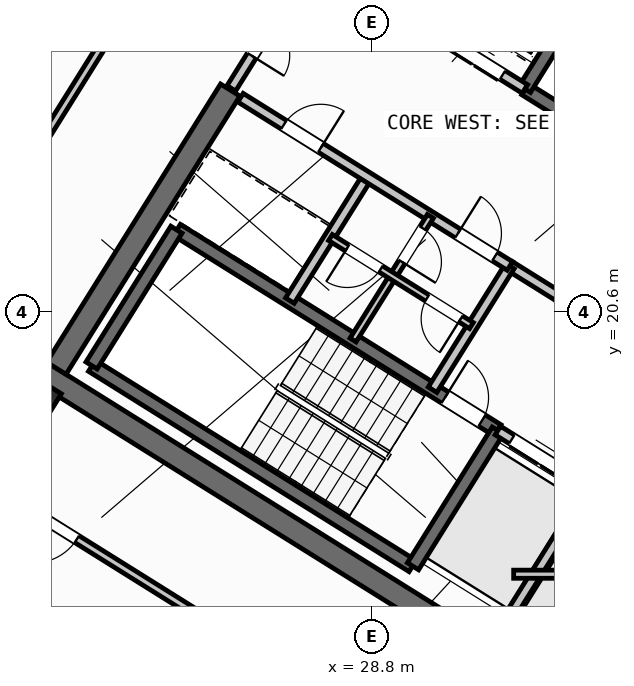
"""IFC4 building model, lengths in metres.
Left out: names, types, materials, properties, quantities, classifications, styles, units other than length and angle.
Written with IfcOpenShell. Run it as: python <this file> out.ifc"""

import sys

from ifc_helpers import new_model, si_unit, direction, frame, frame_2d, origin, origin_2d, place, context, subcontext, project, spatial, rectangle, hollow_rectangle, extrude, source, transform, mapped, element, fill, save


model = new_model("IFC4")
c1 = context("Model", 3, precision=1e-05, world=origin(), true_north=direction((0.0, 1.0)))
c2 = subcontext(c1, "Body", "Model", "MODEL_VIEW")
j1 = project(units=[si_unit("LENGTHUNIT", "METRE"), si_unit("PLANEANGLEUNIT", "RADIAN")], contexts=[c1])
p1 = place(None, origin())
s1 = spatial("IfcSite", under=j1, at=p1, CompositionType="ELEMENT")
p2 = place(p1, origin())
s2 = spatial("IfcBuilding", under=s1, at=p2, CompositionType="ELEMENT")
p3 = place(p2, frame((0.0, 0.0, 288.0)))
s3 = spatial("IfcBuildingStorey", under=s2, at=p3, CompositionType="ELEMENT", Elevation=288.0)
p4 = place(p3, frame((40.531, 24.036, 0.0), z_axis=(0.0, 0.0, 1.0), x_axis=(-0.848048787466, 0.529918157905, 0.0)))
e1 = element("IfcWall", 1, at=p4, inside=s3, PredefinedType="SHEAR", context=c2, shape_type="SweptSolid", body=[
    extrude(rectangle(XDim=13.04, YDim=0.45, at=frame_2d((6.52, 0.0))), origin(), (0.0, 0.0, 1.0), 3.35),
])
p5 = place(p3, frame((33.324, 12.503, 0.0), z_axis=(0.0, 0.0, 1.0), x_axis=(-0.848043529849, 0.529926571782, 0.0)))
e2 = element("IfcWall", 2, at=p5, inside=s3, PredefinedType="SHEAR", context=c2, shape_type="SweptSolid", body=[
    extrude(rectangle(XDim=13.04, YDim=0.45, at=frame_2d((6.52, 0.0))), origin(), (0.0, 0.0, 1.0), 3.35),
])
p6 = place(p3, frame((26.007, 24.976, 0.0), z_axis=(0.0, 0.0, 1.0), x_axis=(-0.529931155655, -0.848040665456, 0.0)))
e3 = element("IfcWall", 3, at=p6, inside=s3, PredefinedType="SHEAR", context=c2, shape_type="SweptSolid", body=[
    extrude(rectangle(XDim=6.475, YDim=0.45, at=frame_2d((3.238, 0.0))), origin(), (0.0, 0.0, 1.0), 3.35),
])
m1 = source(origin(), c2, "Body", "SweptSolid", [
    extrude(hollow_rectangle(XDim=0.7, YDim=0.7, WallThickness=0.028, at=origin_2d()), origin(), (0.0, 0.0, 1.0), 3.6),
])
p7 = place(p3, frame((22.191, 18.87, 0.0), z_axis=(0.0, 0.0, 1.0), x_axis=(-0.848048096156, 0.529919264233, 0.0)))
e4 = element("IfcColumn", 4, at=p7, inside=s3, PredefinedType="COLUMN", context=c2, shape_type="MappedRepresentation", body=[
    mapped(m1, transform((0.0, 0.0, 0.0), scale=1.0)),
])
p8 = place(p3, frame((29.268, 6.429, 0.0), z_axis=(0.0, 0.0, 1.0), x_axis=(-0.848048398186, 0.529918780885, 0.0)))
e5 = element("IfcWall", 5, at=p8, inside=s3, PredefinedType="STANDARD", context=c2, shape_type="SweptSolid", body=[
    extrude(rectangle(XDim=25.188, YDim=0.32, at=frame_2d((12.594, 0.0))), origin(), (0.0, 0.0, 1.0), 3.35),
])
p9 = place(p8, frame((16.362, 0.0, 0.0)))
e6 = element("IfcOpeningElement", 6, at=p9, cuts=e5, PredefinedType="OPENING", context=c2, shape_type="SweptSolid", body=[
    extrude(rectangle(XDim=1.2, YDim=2.15, at=frame_2d((0.6, 1.075))), frame((0.0, 0.17, 0.0), z_axis=(0.0, -1.0, 0.0), x_axis=(1.0, 0.0, 0.0)), (0.0, 0.0, 1.0), 0.34),
])
p10 = place(p8, frame((3.859, 0.0, 0.9)))
e7 = element("IfcOpeningElement", 7, at=p10, cuts=e5, PredefinedType="OPENING", context=c2, shape_type="SweptSolid", body=[
    extrude(rectangle(XDim=1.65, YDim=1.45, at=frame_2d((0.825, 0.725))), frame((0.0, 0.17, 0.0), z_axis=(0.0, -1.0, 0.0), x_axis=(1.0, 0.0, 0.0)), (0.0, 0.0, 1.0), 0.34),
])
p11 = place(p8, frame((10.519, 0.0, 0.9)))
e8 = element("IfcOpeningElement", 8, at=p11, cuts=e5, PredefinedType="OPENING", context=c2, shape_type="SweptSolid", body=[
    extrude(rectangle(XDim=1.65, YDim=1.45, at=frame_2d((0.825, 0.725))), frame((0.0, 0.17, 0.0), z_axis=(0.0, -1.0, 0.0), x_axis=(1.0, 0.0, 0.0)), (0.0, 0.0, 1.0), 0.34),
])
p12 = place(p8, frame((19.841, 0.0, 0.95)))
e9 = element("IfcOpeningElement", 9, at=p12, cuts=e5, PredefinedType="OPENING", context=c2, shape_type="SweptSolid", body=[
    extrude(rectangle(XDim=1.95, YDim=1.35, at=frame_2d((0.975, 0.675))), frame((0.0, 0.17, 0.0), z_axis=(0.0, -1.0, 0.0), x_axis=(1.0, 0.0, 0.0)), (0.0, 0.0, 1.0), 0.34),
])
p13 = place(p8, frame((23.478, 0.0, 1.0)))
e10 = element("IfcOpeningElement", 10, at=p13, cuts=e5, PredefinedType="OPENING", context=c2, shape_type="SweptSolid", body=[
    extrude(rectangle(XDim=0.9, YDim=1.25, at=frame_2d((0.45, 0.625))), frame((0.0, 0.17, 0.0), z_axis=(0.0, -1.0, 0.0), x_axis=(1.0, 0.0, 0.0)), (0.0, 0.0, 1.0), 0.34),
])
p14 = place(p3, frame((19.566, 38.434, 0.0), z_axis=(0.0, 0.0, 1.0), x_axis=(0.84804567626, -0.529923136858, 0.0)))
e11 = element("IfcWall", 11, at=p14, inside=s3, PredefinedType="STANDARD", context=c2, shape_type="SweptSolid", body=[
    extrude(rectangle(XDim=25.188, YDim=0.32, at=frame_2d((12.594, 0.0))), origin(), (0.0, 0.0, 1.0), 3.35),
])
p15 = place(p14, frame((3.355, 0.0, 0.0)))
e12 = element("IfcOpeningElement", 12, at=p15, cuts=e11, PredefinedType="OPENING", context=c2, shape_type="SweptSolid", body=[
    extrude(rectangle(XDim=1.05, YDim=2.15, at=frame_2d((0.525, 1.075))), frame((0.0, 0.17, 0.0), z_axis=(0.0, -1.0, 0.0), x_axis=(1.0, 0.0, 0.0)), (0.0, 0.0, 1.0), 0.34),
])
p16 = place(p14, frame((0.939, 0.0, 0.9)))
e13 = element("IfcOpeningElement", 13, at=p16, cuts=e11, PredefinedType="OPENING", context=c2, shape_type="SweptSolid", body=[
    extrude(rectangle(XDim=1.65, YDim=1.45, at=frame_2d((0.825, 0.725))), frame((0.0, 0.17, 0.0), z_axis=(0.0, -1.0, 0.0), x_axis=(1.0, 0.0, 0.0)), (0.0, 0.0, 1.0), 0.34),
])
p17 = place(p14, frame((7.499, 0.0, 0.9)))
e14 = element("IfcOpeningElement", 14, at=p17, cuts=e11, PredefinedType="OPENING", context=c2, shape_type="SweptSolid", body=[
    extrude(rectangle(XDim=1.35, YDim=1.45, at=frame_2d((0.675, 0.725))), frame((0.0, 0.17, 0.0), z_axis=(0.0, -1.0, 0.0), x_axis=(1.0, 0.0, 0.0)), (0.0, 0.0, 1.0), 0.34),
])
p18 = place(p14, frame((10.754, 0.0, 1.0)))
e15 = element("IfcOpeningElement", 15, at=p18, cuts=e11, PredefinedType="OPENING", context=c2, shape_type="SweptSolid", body=[
    extrude(rectangle(XDim=0.9, YDim=1.25, at=frame_2d((0.45, 0.625))), frame((0.0, 0.17, 0.0), z_axis=(0.0, -1.0, 0.0), x_axis=(1.0, 0.0, 0.0)), (0.0, 0.0, 1.0), 0.34),
])
p19 = place(p14, frame((15.694, 0.0, 1.0)))
e16 = element("IfcOpeningElement", 16, at=p19, cuts=e11, PredefinedType="OPENING", context=c2, shape_type="SweptSolid", body=[
    extrude(rectangle(XDim=0.9, YDim=1.25, at=frame_2d((0.45, 0.625))), frame((0.0, 0.17, 0.0), z_axis=(0.0, -1.0, 0.0), x_axis=(1.0, 0.0, 0.0)), (0.0, 0.0, 1.0), 0.34),
])
p20 = place(p14, frame((21.394, 0.0, 1.0)))
e17 = element("IfcOpeningElement", 17, at=p20, cuts=e11, PredefinedType="OPENING", context=c2, shape_type="SweptSolid", body=[
    extrude(rectangle(XDim=0.9, YDim=1.25, at=frame_2d((0.45, 0.625))), frame((0.0, 0.17, 0.0), z_axis=(0.0, -1.0, 0.0), x_axis=(1.0, 0.0, 0.0)), (0.0, 0.0, 1.0), 0.34),
])
p21 = place(p3, frame((29.605, 15.581, 0.0), z_axis=(0.0, 0.0, 1.0), x_axis=(-0.848036911448, 0.529937163087, 0.0)))
e18 = element("IfcWall", 18, at=p21, inside=s3, PredefinedType="SHEAR", context=c2, shape_type="SweptSolid", body=[
    extrude(rectangle(XDim=7.46, YDim=0.26, at=frame_2d((3.73, 0.0))), origin(), (0.0, 0.0, 1.0), 3.35),
])
p22 = place(p3, frame((31.28, 18.261, 0.0), z_axis=(0.0, 0.0, 1.0), x_axis=(-0.848051618787, 0.529913626805, 0.0)))
e19 = element("IfcWall", 19, at=p22, inside=s3, PredefinedType="SHEAR", context=c2, shape_type="SweptSolid", body=[
    extrude(rectangle(XDim=7.46, YDim=0.26, at=frame_2d((3.73, 0.0))), origin(), (0.0, 0.0, 1.0), 3.35),
])
p23 = place(p22, frame((0.36, 0.0, 0.0)))
e20 = element("IfcOpeningElement", 20, at=p23, cuts=e19, PredefinedType="OPENING", context=c2, shape_type="SweptSolid", body=[
    extrude(rectangle(XDim=0.86, YDim=2.05, at=frame_2d((0.43, 1.025))), frame((0.0, 0.14, 0.0), z_axis=(0.0, -1.0, 0.0), x_axis=(1.0, 0.0, 0.0)), (0.0, 0.0, 1.0), 0.28),
])
p24 = place(p3, frame((31.288, 18.256, 0.0), z_axis=(0.0, 0.0, 1.0), x_axis=(-0.529943379326, -0.848033026897, 0.0)))
e21 = element("IfcWall", 21, at=p24, inside=s3, PredefinedType="SHEAR", context=c2, shape_type="SweptSolid", body=[
    extrude(rectangle(XDim=3.16, YDim=0.26, at=frame_2d((1.58, 0.0))), origin(), (0.0, 0.0, 1.0), 3.35),
])
p25 = place(p3, frame((24.945, 22.22, 0.0), z_axis=(0.0, 0.0, 1.0), x_axis=(-0.529908658664, -0.84805472316, 0.0)))
e22 = element("IfcWall", 22, at=p25, inside=s3, PredefinedType="SHEAR", context=c2, shape_type="SweptSolid", body=[
    extrude(rectangle(XDim=3.16, YDim=0.26, at=frame_2d((1.58, 0.0))), origin(), (0.0, 0.0, 1.0), 3.35),
])
p26 = place(p3, frame((38.046, 21.108, 0.0), z_axis=(0.0, 0.0, 1.0), x_axis=(-0.848054434086, 0.529909121291, 0.0)))
e23 = element("IfcWall", 23, at=p26, inside=s3, PredefinedType="SHEAR", context=c2, shape_type="SweptSolid", body=[
    extrude(rectangle(XDim=7.33, YDim=0.26, at=frame_2d((3.665, 0.0))), origin(), (0.0, 0.0, 1.0), 3.35),
])
p27 = place(p26, frame((0.22, 0.0, 0.0)))
e24 = element("IfcOpeningElement", 24, at=p27, cuts=e23, PredefinedType="OPENING", context=c2, shape_type="SweptSolid", body=[
    extrude(rectangle(XDim=1.1, YDim=2.1, at=frame_2d((0.55, 1.05))), frame((0.0, 0.14, 0.0), z_axis=(0.0, -1.0, 0.0), x_axis=(1.0, 0.0, 0.0)), (0.0, 0.0, 1.0), 0.28),
])
p28 = place(p3, frame((33.496, 27.677, 0.0), z_axis=(0.0, 0.0, 1.0), x_axis=(-0.529908658664, -0.84805472316, 0.0)))
e25 = element("IfcWall", 25, at=p28, inside=s3, PredefinedType="SHEAR", context=c2, shape_type="SweptSolid", body=[
    extrude(rectangle(XDim=3.16, YDim=0.26, at=frame_2d((1.58, 0.0))), origin(), (0.0, 0.0, 1.0), 3.35),
])
p29 = place(p3, frame((34.933, 15.978, 0.0), z_axis=(0.0, 0.0, 1.0), x_axis=(-0.848055739377, 0.529907032327, 0.0)))
e26 = element("IfcWall", 26, at=p29, inside=s3, PredefinedType="STANDARD", context=c2, shape_type="SweptSolid", body=[
    extrude(rectangle(XDim=4.298, YDim=0.2, at=frame_2d((2.149, 0.0))), origin(), (0.0, 0.0, 1.0), 3.34),
])
p30 = place(p29, frame((0.448, 0.0, 0.0)))
e27 = element("IfcOpeningElement", 27, at=p30, cuts=e26, PredefinedType="OPENING", context=c2, shape_type="SweptSolid", body=[
    extrude(rectangle(XDim=1.3, YDim=2.2, at=frame_2d((0.65, 1.1))), frame((0.0, 0.11, 0.0), z_axis=(0.0, -1.0, 0.0), x_axis=(1.0, 0.0, 0.0)), (0.0, 0.0, 1.0), 0.22),
])
p31 = place(p29, frame((2.523, 0.0, 0.0)))
e28 = element("IfcOpeningElement", 28, at=p31, cuts=e26, PredefinedType="OPENING", context=c2, shape_type="SweptSolid", body=[
    extrude(rectangle(XDim=1.45, YDim=2.25, at=frame_2d((0.725, 1.125))), frame((0.0, 0.11, 0.0), z_axis=(0.0, -1.0, 0.0), x_axis=(1.0, 0.0, 0.0)), (0.0, 0.0, 1.0), 0.22),
])
p32 = place(p3, frame((36.459, 18.421, 0.0), z_axis=(0.0, 0.0, 1.0), x_axis=(-0.848059591691, 0.529900867089, 0.0)))
e29 = element("IfcWall", 29, at=p32, inside=s3, PredefinedType="STANDARD", context=c2, shape_type="SweptSolid", body=[
    extrude(rectangle(XDim=5.818, YDim=0.2, at=frame_2d((2.909, 0.0))), origin(), (0.0, 0.0, 1.0), 3.34),
])
p33 = place(p32, frame((2.598, 0.0, 0.0)))
e30 = element("IfcOpeningElement", 30, at=p33, cuts=e29, PredefinedType="OPENING", context=c2, shape_type="SweptSolid", body=[
    extrude(rectangle(XDim=1.15, YDim=2.1, at=frame_2d((0.575, 1.05))), frame((0.0, 0.11, 0.0), z_axis=(0.0, -1.0, 0.0), x_axis=(1.0, 0.0, 0.0)), (0.0, 0.0, 1.0), 0.22),
])
p34 = place(p3, frame((31.822, 24.998, 0.0), z_axis=(0.0, 0.0, 1.0), x_axis=(-0.848054125777, 0.529909614701, 0.0)))
e31 = element("IfcWall", 31, at=p34, inside=s3, PredefinedType="STANDARD", context=c2, shape_type="SweptSolid", body=[
    extrude(rectangle(XDim=4.668, YDim=0.2, at=frame_2d((2.334, 0.0))), origin(), (0.0, 0.0, 1.0), 3.34),
])
p35 = place(p34, frame((0.52, 0.0, 0.0)))
e32 = element("IfcOpeningElement", 32, at=p35, cuts=e31, PredefinedType="OPENING", context=c2, shape_type="SweptSolid", body=[
    extrude(rectangle(XDim=1.2, YDim=2.15, at=frame_2d((0.6, 1.075))), frame((0.0, 0.11, 0.0), z_axis=(0.0, -1.0, 0.0), x_axis=(1.0, 0.0, 0.0)), (0.0, 0.0, 1.0), 0.22),
])
p36 = place(p34, frame((2.54, 0.0, 0.0)))
e33 = element("IfcOpeningElement", 33, at=p36, cuts=e31, PredefinedType="OPENING", context=c2, shape_type="SweptSolid", body=[
    extrude(rectangle(XDim=1.2, YDim=2.15, at=frame_2d((0.6, 1.075))), frame((0.0, 0.11, 0.0), z_axis=(0.0, -1.0, 0.0), x_axis=(1.0, 0.0, 0.0)), (0.0, 0.0, 1.0), 0.22),
])
p37 = place(p3, frame((33.029, 17.003, 0.0), z_axis=(0.0, 0.0, 1.0), x_axis=(-0.529916267533, -0.848049968695, 0.0)))
e34 = element("IfcWall", 34, at=p37, inside=s3, PredefinedType="STANDARD", context=c2, shape_type="SweptSolid", body=[
    extrude(rectangle(XDim=2.92, YDim=0.2, at=frame_2d((1.46, 0.0))), origin(), (0.0, 0.0, 1.0), 3.34),
])
for number, where, z_axis, x_axis in (
    (35, (31.525, 21.504, 0.0), (0.0, 0.0, 1.0), (-0.53, -0.848, 0.0)),
    (36, (28.71, 23.263, 0.0), (0.0, 0.0, 1.0), (-0.53, -0.848, 0.0)),
):
    element("IfcWall", number, at=place(p3, frame(where, z_axis=z_axis, x_axis=x_axis)), inside=s3, PredefinedType="STANDARD", context=c2, shape_type="SweptSolid", body=[
        extrude(rectangle(XDim=2.88, YDim=0.2, at=frame_2d((1.44, 0.0))), origin(), (0.0, 0.0, 1.0), 3.34),
    ])
p38 = place(p3, frame((31.525, 21.504, 0.0), z_axis=(0.0, 0.0, 1.0), x_axis=(-0.848042066329, 0.529928913853, 0.0)))
e37 = element("IfcWall", 37, at=p38, inside=s3, PredefinedType="STANDARD", context=c2, shape_type="SweptSolid", body=[
    extrude(rectangle(XDim=6.268, YDim=0.2, at=frame_2d((3.134, 0.0))), origin(), (0.0, 0.0, 1.0), 3.34),
])
p39 = place(p38, frame((4.4, 0.0, 0.0)))
e38 = element("IfcOpeningElement", 38, at=p39, cuts=e37, PredefinedType="OPENING", context=c2, shape_type="SweptSolid", body=[
    extrude(rectangle(XDim=0.86, YDim=2.05, at=frame_2d((0.43, 1.025))), frame((0.0, 0.11, 0.0), z_axis=(0.0, -1.0, 0.0), x_axis=(1.0, 0.0, 0.0)), (0.0, 0.0, 1.0), 0.22),
])
p40 = place(p38, frame((0.35, 0.0, 0.0)))
e39 = element("IfcOpeningElement", 39, at=p40, cuts=e37, PredefinedType="OPENING", context=c2, shape_type="SweptSolid", body=[
    extrude(rectangle(XDim=0.86, YDim=2.05, at=frame_2d((0.43, 1.025))), frame((0.0, 0.11, 0.0), z_axis=(0.0, -1.0, 0.0), x_axis=(1.0, 0.0, 0.0)), (0.0, 0.0, 1.0), 0.22),
])
p41 = place(p3, frame((29.956, 22.484, 0.0), z_axis=(0.0, 0.0, 1.0), x_axis=(-0.529951914384, -0.848027693204, 0.0)))
e40 = element("IfcWall", 40, at=p41, inside=s3, PredefinedType="PLUMBINGWALL", context=c2, shape_type="SweptSolid", body=[
    extrude(rectangle(XDim=1.4, YDim=0.14, at=frame_2d((0.7, 0.0))), origin(), (0.0, 0.0, 1.0), 3.34),
])
p42 = place(p41, frame((0.28, 0.0, 0.0)))
e41 = element("IfcOpeningElement", 41, at=p42, cuts=e40, PredefinedType="OPENING", context=c2, shape_type="SweptSolid", body=[
    extrude(rectangle(XDim=0.78, YDim=2.05, at=frame_2d((0.39, 1.025))), frame((0.0, 0.08, 0.0), z_axis=(0.0, -1.0, 0.0), x_axis=(1.0, 0.0, 0.0)), (0.0, 0.0, 1.0), 0.16),
])
p43 = place(p3, frame((29.214, 21.297, 0.0), z_axis=(0.0, 0.0, 1.0), x_axis=(-0.529865479138, -0.848081702443, 0.0)))
e42 = element("IfcWall", 42, at=p43, inside=s3, PredefinedType="PLUMBINGWALL", context=c2, shape_type="SweptSolid", body=[
    extrude(rectangle(XDim=1.48, YDim=0.14, at=frame_2d((0.74, 0.0))), origin(), (0.0, 0.0, 1.0), 3.34),
])
p44 = place(p3, frame((30.766, 20.327, 0.0), z_axis=(0.0, 0.0, 1.0), x_axis=(-0.848052663127, 0.529911955482, 0.0)))
e43 = element("IfcWall", 43, at=p44, inside=s3, PredefinedType="PLUMBINGWALL", context=c2, shape_type="SweptSolid", body=[
    extrude(rectangle(XDim=3.28, YDim=0.14, at=frame_2d((1.64, 0.0))), origin(), (0.0, 0.0, 1.0), 3.34),
])
p45 = place(p44, frame((0.25, 0.0, 0.0)))
e44 = element("IfcOpeningElement", 44, at=p45, cuts=e43, PredefinedType="OPENING", context=c2, shape_type="SweptSolid", body=[
    extrude(rectangle(XDim=0.78, YDim=2.05, at=frame_2d((0.39, 1.025))), frame((0.0, 0.08, 0.0), z_axis=(0.0, -1.0, 0.0), x_axis=(1.0, 0.0, 0.0)), (0.0, 0.0, 1.0), 0.16),
])
p46 = place(p44, frame((2.11, 0.0, 0.0)))
e45 = element("IfcOpeningElement", 45, at=p46, cuts=e43, PredefinedType="OPENING", context=c2, shape_type="SweptSolid", body=[
    extrude(rectangle(XDim=0.78, YDim=2.05, at=frame_2d((0.39, 1.025))), frame((0.0, 0.08, 0.0), z_axis=(0.0, -1.0, 0.0), x_axis=(1.0, 0.0, 0.0)), (0.0, 0.0, 1.0), 0.16),
])
p47 = place(p3, frame((27.596, 27.52, 0.0), z_axis=(0.0, 0.0, 1.0), x_axis=(-0.529865479138, -0.848081702443, 0.0)))
e46 = element("IfcWall", 46, at=p47, inside=s3, PredefinedType="STANDARD", context=c2, shape_type="SweptSolid", body=[
    extrude(rectangle(XDim=2.96, YDim=0.2, at=frame_2d((1.48, 0.0))), origin(), (0.0, 0.0, 1.0), 3.34),
])
p48 = place(p47, frame((0.7, 0.0, 0.0)))
e47 = element("IfcOpeningElement", 47, at=p48, cuts=e46, PredefinedType="OPENING", context=c2, shape_type="SweptSolid", body=[
    extrude(rectangle(XDim=1.5, YDim=2.15, at=frame_2d((0.75, 1.075))), frame((0.0, 0.11, 0.0), z_axis=(0.0, -1.0, 0.0), x_axis=(1.0, 0.0, 0.0)), (0.0, 0.0, 1.0), 0.22),
])
p49 = place(p3, frame((25.807, 29.582, 0.0), z_axis=(0.0, 0.0, 1.0), x_axis=(-0.529918119251, -0.84804881162, 0.0)))
e48 = element("IfcWall", 48, at=p49, inside=s3, PredefinedType="PARTITIONING", context=c2, shape_type="SweptSolid", body=[
    extrude(rectangle(XDim=17.65, YDim=0.16, at=frame_2d((8.825, 0.0))), origin(), (0.0, 0.0, 1.0), 3.34),
])
p50 = place(p3, frame((32.164, 10.374, 0.0), z_axis=(0.0, 0.0, 1.0), x_axis=(-0.848044107957, 0.529925646633, 0.0)))
e49 = element("IfcWall", 49, at=p50, inside=s3, PredefinedType="PARTITIONING", context=c2, shape_type="SweptSolid", body=[
    extrude(rectangle(XDim=15.57, YDim=0.16, at=frame_2d((7.785, 0.0))), origin(), (0.0, 0.0, 1.0), 3.34),
])
p51 = place(p50, frame((10.83, 0.0, 0.0)))
e50 = element("IfcOpeningElement", 50, at=p51, cuts=e49, PredefinedType="OPENING", context=c2, shape_type="SweptSolid", body=[
    extrude(rectangle(XDim=1.0, YDim=2.1, at=frame_2d((0.5, 1.05))), frame((0.0, 0.09, 0.0), z_axis=(0.0, -1.0, 0.0), x_axis=(1.0, 0.0, 0.0)), (0.0, 0.0, 1.0), 0.18),
])
p52 = place(p3, frame((29.72, 8.859, 0.0), z_axis=(0.0, 0.0, 1.0), x_axis=(-0.848049134363, 0.529917602752, 0.0)))
e51 = element("IfcWall", 51, at=p52, inside=s3, PredefinedType="PLUMBINGWALL", context=c2, shape_type="SweptSolid", body=[
    extrude(rectangle(XDim=14.3, YDim=0.14, at=frame_2d((7.15, 0.0))), origin(), (0.0, 0.0, 1.0), 3.34),
])
p53 = place(p52, frame((9.57, 0.0, 0.0)))
e52 = element("IfcOpeningElement", 52, at=p53, cuts=e51, PredefinedType="OPENING", context=c2, shape_type="SweptSolid", body=[
    extrude(rectangle(XDim=0.92, YDim=2.08, at=frame_2d((0.46, 1.04))), frame((0.0, 0.08, 0.0), z_axis=(0.0, -1.0, 0.0), x_axis=(1.0, 0.0, 0.0)), (0.0, 0.0, 1.0), 0.16),
])
p54 = place(p3, frame((31.6, 15.42, 0.0), z_axis=(0.0, 0.0, 1.0), x_axis=(1.0, 0.0, 0.0)))
e53 = element("IfcWall", 53, at=p54, inside=s3, PredefinedType="PARTITIONING", context=c2, shape_type="SweptSolid", body=[
    extrude(rectangle(XDim=2.984, YDim=0.16, at=frame_2d((1.492, 0.0))), origin(), (0.0, 0.0, 1.0), 3.34),
])
m2 = source(origin(), c2, "Body", "SweptSolid", [
    extrude(rectangle(XDim=0.86, YDim=2.05, at=frame_2d((0.43, 1.025))), frame((0.0, 0.025, 0.0), z_axis=(0.0, -1.0, 0.0), x_axis=(1.0, 0.0, 0.0)), (0.0, 0.0, 1.0), 0.05),
])
p55 = place(p23, frame((0.86, 0.0, 0.0), z_axis=(0.0, 0.0, 1.0), x_axis=(-1.0, 0.0, 0.0)))
e54 = element("IfcDoor", 54, at=p55, inside=s3, OperationType="SINGLE_SWING_LEFT", PredefinedType="DOOR", context=c2, shape_type="MappedRepresentation", body=[
    mapped(m2, transform((0.0, 0.0, 0.0), scale=1.0)),
])
fill(e20, e54)
m3 = source(origin(), c2, "Body", "SweptSolid", [
    extrude(rectangle(XDim=1.45, YDim=2.25, at=frame_2d((0.725, 1.125))), frame((0.0, 0.025, 0.0), z_axis=(0.0, -1.0, 0.0), x_axis=(1.0, 0.0, 0.0)), (0.0, 0.0, 1.0), 0.05),
])
p56 = place(p31, origin())
e55 = element("IfcDoor", 55, at=p56, inside=s3, OperationType="DOUBLE_DOOR_SLIDING", PredefinedType="DOOR", context=c2, shape_type="MappedRepresentation", body=[
    mapped(m3, transform((0.0, 0.0, 0.0), scale=1.0)),
])
fill(e28, e55)
m4 = source(origin(), c2, "Body", "SweptSolid", [
    extrude(rectangle(XDim=1.2, YDim=2.15, at=frame_2d((0.6, 1.075))), frame((0.0, 0.025, 0.0), z_axis=(0.0, -1.0, 0.0), x_axis=(1.0, 0.0, 0.0)), (0.0, 0.0, 1.0), 0.05),
])
p57 = place(p35, origin())
e56 = element("IfcDoor", 56, at=p57, inside=s3, OperationType="DOUBLE_DOOR_SLIDING", PredefinedType="DOOR", context=c2, shape_type="MappedRepresentation", body=[
    mapped(m4, transform((0.0, 0.0, 0.0), scale=1.0)),
])
fill(e32, e56)
p58 = place(p39, frame((0.86, 0.0, 0.0), z_axis=(0.0, 0.0, 1.0), x_axis=(-1.0, 0.0, 0.0)))
e57 = element("IfcDoor", 57, at=p58, inside=s3, OperationType="SINGLE_SWING_RIGHT", PredefinedType="DOOR", context=c2, shape_type="MappedRepresentation", body=[
    mapped(m2, transform((0.0, 0.0, 0.0), scale=1.0)),
])
fill(e38, e57)
p59 = place(p40, frame((0.86, 0.0, 0.0), z_axis=(0.0, 0.0, 1.0), x_axis=(-1.0, 0.0, 0.0)))
e58 = element("IfcDoor", 58, at=p59, inside=s3, OperationType="SINGLE_SWING_LEFT", PredefinedType="DOOR", context=c2, shape_type="MappedRepresentation", body=[
    mapped(m2, transform((0.0, 0.0, 0.0), scale=1.0)),
])
fill(e39, e58)
m5 = source(origin(), c2, "Body", "SweptSolid", [
    extrude(rectangle(XDim=0.78, YDim=2.05, at=frame_2d((0.39, 1.025))), frame((0.0, 0.025, 0.0), z_axis=(0.0, -1.0, 0.0), x_axis=(1.0, 0.0, 0.0)), (0.0, 0.0, 1.0), 0.05),
])
p60 = place(p42, origin())
e59 = element("IfcDoor", 59, at=p60, inside=s3, OperationType="SINGLE_SWING_RIGHT", PredefinedType="DOOR", context=c2, shape_type="MappedRepresentation", body=[
    mapped(m5, transform((0.0, 0.0, 0.0), scale=1.0)),
])
fill(e41, e59)
p61 = place(p45, origin())
e60 = element("IfcDoor", 60, at=p61, inside=s3, OperationType="SINGLE_SWING_LEFT", PredefinedType="DOOR", context=c2, shape_type="MappedRepresentation", body=[
    mapped(m5, transform((0.0, 0.0, 0.0), scale=1.0)),
])
fill(e44, e60)
p62 = place(p46, origin())
e61 = element("IfcDoor", 61, at=p62, inside=s3, OperationType="SINGLE_SWING_RIGHT", PredefinedType="DOOR", context=c2, shape_type="MappedRepresentation", body=[
    mapped(m5, transform((0.0, 0.0, 0.0), scale=1.0)),
])
fill(e45, e61)
m6 = source(origin(), c2, "Body", "SweptSolid", [
    extrude(rectangle(XDim=1.5, YDim=2.15, at=frame_2d((0.75, 1.075))), frame((0.0, 0.025, 0.0), z_axis=(0.0, -1.0, 0.0), x_axis=(1.0, 0.0, 0.0)), (0.0, 0.0, 1.0), 0.05),
])
p63 = place(p48, origin())
e62 = element("IfcDoor", 62, at=p63, inside=s3, OperationType="DOUBLE_DOOR_SINGLE_SWING", PredefinedType="DOOR", context=c2, shape_type="MappedRepresentation", body=[
    mapped(m6, transform((0.0, 0.0, 0.0), scale=1.0)),
])
fill(e47, e62)
m7 = source(origin(), c2, "Body", "SweptSolid", [
    extrude(rectangle(XDim=1.0, YDim=2.1, at=frame_2d((0.5, 1.05))), frame((0.0, 0.025, 0.0), z_axis=(0.0, -1.0, 0.0), x_axis=(1.0, 0.0, 0.0)), (0.0, 0.0, 1.0), 0.05),
])
p64 = place(p51, origin())
e63 = element("IfcDoor", 63, at=p64, inside=s3, OperationType="SINGLE_SWING_RIGHT", PredefinedType="DOOR", context=c2, shape_type="MappedRepresentation", body=[
    mapped(m7, transform((0.0, 0.0, 0.0), scale=1.0)),
])
fill(e50, e63)
save(model, sys.argv[1])
